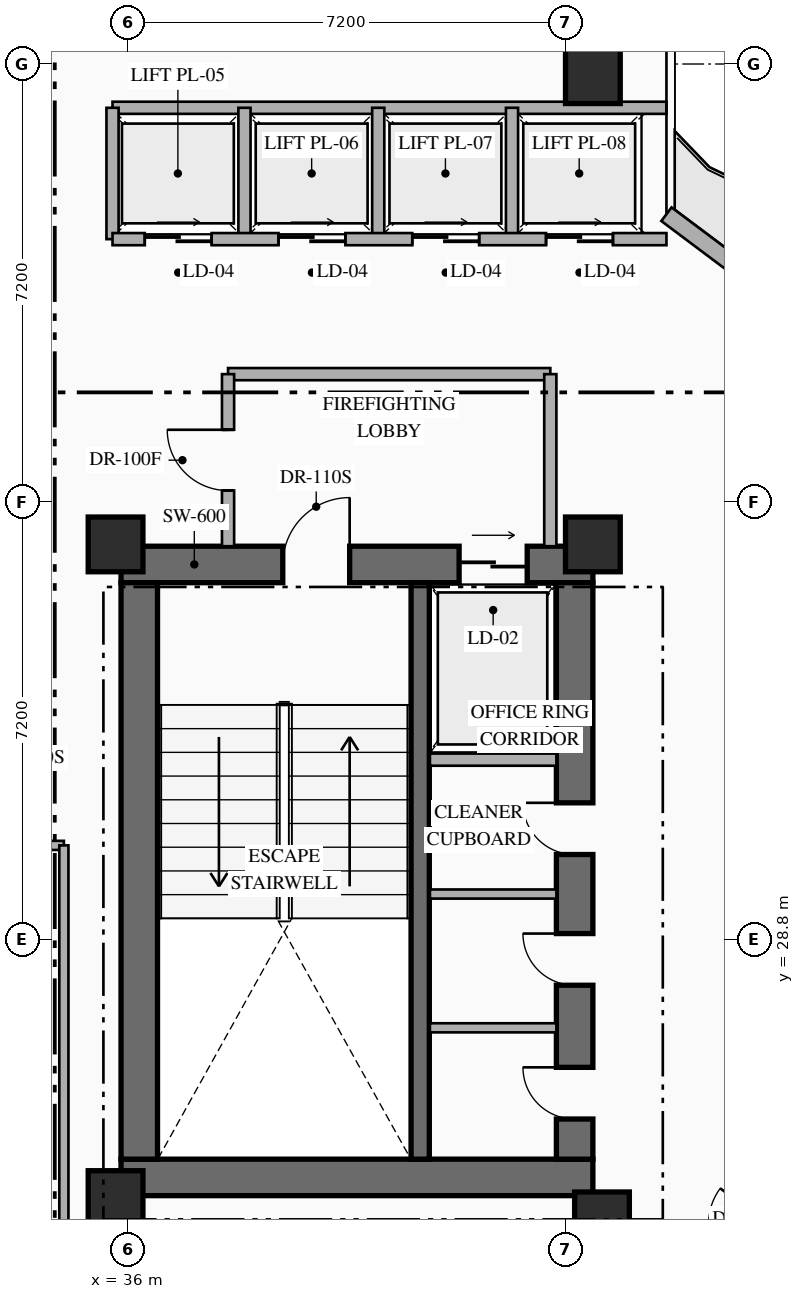
"""IFC4 building model, lengths in metres.
Left out: names, types, materials, properties, quantities, classifications, styles, units other than length and angle.
Written with IfcOpenShell. Run it as: python <this file> out.ifc"""

import sys

from ifc_helpers import new_model, si_unit, direction, frame, frame_2d, origin, origin_2d, place, context, subcontext, project, spatial, rectangle, extrude, element, fill, save


model = new_model("IFC4")
c1 = context("Model", 3, precision=1e-05, world=origin(), true_north=direction((0.0, 1.0)))
c2 = subcontext(c1, "Body", "Model", "MODEL_VIEW")
j1 = project(units=[si_unit("LENGTHUNIT", "METRE"), si_unit("PLANEANGLEUNIT", "RADIAN")], contexts=[c1])
p1 = place(None, origin())
s1 = spatial("IfcSite", under=j1, at=p1, CompositionType="ELEMENT")
p2 = place(p1, origin())
s2 = spatial("IfcBuilding", under=s1, at=p2, CompositionType="ELEMENT")
p3 = place(p2, frame((0.0, 0.0, 115.65)))
s3 = spatial("IfcBuildingStorey", under=s2, at=p3, CompositionType="ELEMENT", Elevation=115.65)
p4 = place(p3, frame((35.89, 24.89, 0.0), z_axis=(0.0, 0.0, 1.0), x_axis=(1.0, 0.0, 0.0)))
e1 = element("IfcWall", 1, at=p4, inside=s3, PredefinedType="SHEAR", context=c2, shape_type="SweptSolid", body=[
    extrude(rectangle(XDim=7.76, YDim=0.6, at=frame_2d((3.88, 0.0))), origin(), (0.0, 0.0, 1.0), 3.6),
])
p5 = place(p3, frame((35.89, 34.97, 0.0), z_axis=(0.0, 0.0, 1.0), x_axis=(1.0, 0.0, 0.0)))
e2 = element("IfcWall", 2, at=p5, inside=s3, PredefinedType="SHEAR", context=c2, shape_type="SweptSolid", body=[
    extrude(rectangle(XDim=7.76, YDim=0.6, at=frame_2d((3.88, 0.0))), origin(), (0.0, 0.0, 1.0), 3.6),
])
p6 = place(p5, frame((2.66, 0.0, 0.0)))
e3 = element("IfcOpeningElement", 3, at=p6, cuts=e2, PredefinedType="OPENING", context=c2, shape_type="SweptSolid", body=[
    extrude(rectangle(XDim=1.1, YDim=2.2, at=frame_2d((0.55, 1.1))), frame((0.0, 0.31, 0.0), z_axis=(0.0, -1.0, 0.0), x_axis=(1.0, 0.0, 0.0)), (0.0, 0.0, 1.0), 0.62),
])
p7 = place(p5, frame((5.56, 0.0, 0.0)))
e4 = element("IfcOpeningElement", 4, at=p7, cuts=e2, PredefinedType="OPENING", context=c2, shape_type="SweptSolid", body=[
    extrude(rectangle(XDim=1.12, YDim=2.15, at=frame_2d((0.56, 1.075))), frame((0.0, 0.31, 0.0), z_axis=(0.0, -1.0, 0.0), x_axis=(1.0, 0.0, 0.0)), (0.0, 0.0, 1.0), 0.62),
])
p8 = place(p3, frame((36.19, 25.19, 0.0), z_axis=(0.0, 0.0, 1.0), x_axis=(0.0, 1.0, 0.0)))
e5 = element("IfcWall", 5, at=p8, inside=s3, PredefinedType="SHEAR", context=c2, shape_type="SweptSolid", body=[
    extrude(rectangle(XDim=9.48, YDim=0.6, at=frame_2d((4.74, 0.0))), origin(), (0.0, 0.0, 1.0), 3.6),
])
p9 = place(p3, frame((43.35, 25.19, 0.0), z_axis=(0.0, 0.0, 1.0), x_axis=(0.0, 1.0, 0.0)))
e6 = element("IfcWall", 6, at=p9, inside=s3, PredefinedType="SHEAR", context=c2, shape_type="SweptSolid", body=[
    extrude(rectangle(XDim=9.48, YDim=0.6, at=frame_2d((4.74, 0.0))), origin(), (0.0, 0.0, 1.0), 3.6),
])
p10 = place(p9, frame((0.66, 0.0, 0.0)))
e7 = element("IfcOpeningElement", 7, at=p10, cuts=e6, PredefinedType="OPENING", context=c2, shape_type="SweptSolid", body=[
    extrude(rectangle(XDim=0.85, YDim=2.08, at=frame_2d((0.425, 1.04))), frame((0.0, 0.31, 0.0), z_axis=(0.0, -1.0, 0.0), x_axis=(1.0, 0.0, 0.0)), (0.0, 0.0, 1.0), 0.62),
])
p11 = place(p9, frame((2.86, 0.0, 0.0)))
e8 = element("IfcOpeningElement", 8, at=p11, cuts=e6, PredefinedType="OPENING", context=c2, shape_type="SweptSolid", body=[
    extrude(rectangle(XDim=0.85, YDim=2.08, at=frame_2d((0.425, 1.04))), frame((0.0, 0.31, 0.0), z_axis=(0.0, -1.0, 0.0), x_axis=(1.0, 0.0, 0.0)), (0.0, 0.0, 1.0), 0.62),
])
p12 = place(p9, frame((5.01, 0.0, 0.0)))
e9 = element("IfcOpeningElement", 9, at=p12, cuts=e6, PredefinedType="OPENING", context=c2, shape_type="SweptSolid", body=[
    extrude(rectangle(XDim=0.85, YDim=2.08, at=frame_2d((0.425, 1.04))), frame((0.0, 0.31, 0.0), z_axis=(0.0, -1.0, 0.0), x_axis=(1.0, 0.0, 0.0)), (0.0, 0.0, 1.0), 0.62),
])
p13 = place(p3, frame((40.81, 25.19, 0.0), z_axis=(0.0, 0.0, 1.0), x_axis=(0.0, 1.0, 0.0)))
e10 = element("IfcWall", 10, at=p13, inside=s3, PredefinedType="SHEAR", context=c2, shape_type="SweptSolid", body=[
    extrude(rectangle(XDim=9.48, YDim=0.3, at=frame_2d((4.74, 0.0))), origin(), (0.0, 0.0, 1.0), 3.6),
])
for number, where, z_axis, x_axis in (
    (11, (35.8, 24.55, 0.0), (0.0, 0.0, 1.0), (1.0, 0.0, 0.0)),
    (12, (43.8, 24.2, 0.0), (0.0, 0.0, 1.0), (1.0, 0.0, 0.0)),
    (13, (35.8, 35.3, 0.0), (0.0, 0.0, 1.0), (1.0, 0.0, 0.0)),
    (14, (43.65, 35.3, 0.0), (0.0, 0.0, 1.0), (1.0, 0.0, 0.0)),
    (15, (43.65, 43.0, 0.0), (0.0, 0.0, 1.0), (1.0, 0.0, 0.0)),
):
    element("IfcColumn", number, at=place(p3, frame(where, z_axis=z_axis, x_axis=x_axis)), inside=s3, PredefinedType="COLUMN", context=c2, shape_type="SweptSolid", body=[
        extrude(rectangle(XDim=0.9, YDim=0.9, at=origin_2d()), origin(), (0.0, 0.0, 1.0), 3.6),
    ])
p14 = place(p3, frame((44.86, 40.73, 0.0), z_axis=(0.0, 0.0, 1.0), x_axis=(0.800006902154, -0.599990797017, 0.0)))
e16 = element("IfcWall", 16, at=p14, inside=s3, PredefinedType="STANDARD", context=c2, shape_type="SweptSolid", body=[
    extrude(rectangle(XDim=29.712, YDim=0.28, at=frame_2d((14.856, 0.0))), origin(), (0.0, 0.0, 1.0), 3.35),
])
p15 = place(p14, frame((14.249, 0.0, 0.0)))
e17 = element("IfcOpeningElement", 17, at=p15, cuts=e16, PredefinedType="OPENING", context=c2, shape_type="SweptSolid", body=[
    extrude(rectangle(XDim=1.1, YDim=2.2, at=frame_2d((0.55, 1.1))), frame((0.0, 0.15, 0.0), z_axis=(0.0, -1.0, 0.0), x_axis=(1.0, 0.0, 0.0)), (0.0, 0.0, 1.0), 0.3),
])
p16 = place(p14, frame((6.528, 0.0, 0.85)))
e18 = element("IfcOpeningElement", 18, at=p16, cuts=e16, PredefinedType="OPENING", context=c2, shape_type="SweptSolid", body=[
    extrude(rectangle(XDim=1.8, YDim=2.1, at=frame_2d((0.9, 1.05))), frame((0.0, 0.15, 0.0), z_axis=(0.0, -1.0, 0.0), x_axis=(1.0, 0.0, 0.0)), (0.0, 0.0, 1.0), 0.3),
])
p17 = place(p14, frame((21.384, 0.0, 0.85)))
e19 = element("IfcOpeningElement", 19, at=p17, cuts=e16, PredefinedType="OPENING", context=c2, shape_type="SweptSolid", body=[
    extrude(rectangle(XDim=1.8, YDim=2.1, at=frame_2d((0.9, 1.05))), frame((0.0, 0.15, 0.0), z_axis=(0.0, -1.0, 0.0), x_axis=(1.0, 0.0, 0.0)), (0.0, 0.0, 1.0), 0.3),
])
p18 = place(p3, frame((40.97, 31.76, 0.0), z_axis=(0.0, 0.0, 1.0), x_axis=(1.0, 0.0, 0.0)))
e20 = element("IfcWall", 20, at=p18, inside=s3, PredefinedType="STANDARD", context=c2, shape_type="SweptSolid", body=[
    extrude(rectangle(XDim=2.08, YDim=0.2, at=frame_2d((1.04, 0.0))), origin(), (0.0, 0.0, 1.0), 3.35),
])
for number, where, z_axis, x_axis in (
    (21, (40.97, 27.35, 0.0), (0.0, 0.0, 1.0), (1.0, 0.0, 0.0)),
    (22, (40.97, 29.55, 0.0), (0.0, 0.0, 1.0), (1.0, 0.0, 0.0)),
):
    element("IfcWall", number, at=place(p3, frame(where, z_axis=z_axis, x_axis=x_axis)), inside=s3, PredefinedType="PARTITIONING", context=c2, shape_type="SweptSolid", body=[
        extrude(rectangle(XDim=2.08, YDim=0.15, at=frame_2d((1.04, 0.0))), origin(), (0.0, 0.0, 1.0), 3.35),
    ])
p19 = place(p3, frame((37.65, 38.1, 0.0), z_axis=(0.0, 0.0, 1.0), x_axis=(1.0, 0.0, 0.0)))
e23 = element("IfcWall", 23, at=p19, inside=s3, PredefinedType="STANDARD", context=c2, shape_type="SweptSolid", body=[
    extrude(rectangle(XDim=5.3, YDim=0.2, at=frame_2d((2.65, 0.0))), origin(), (0.0, 0.0, 1.0), 3.35),
])
p20 = place(p3, frame((42.95, 35.27, 0.0), z_axis=(0.0, 0.0, 1.0), x_axis=(0.0, 1.0, 0.0)))
e24 = element("IfcWall", 24, at=p20, inside=s3, PredefinedType="STANDARD", context=c2, shape_type="SweptSolid", body=[
    extrude(rectangle(XDim=2.83, YDim=0.2, at=frame_2d((1.415, 0.0))), origin(), (0.0, 0.0, 1.0), 3.35),
])
p21 = place(p3, frame((37.65, 35.27, 0.0), z_axis=(0.0, 0.0, 1.0), x_axis=(0.0, 1.0, 0.0)))
e25 = element("IfcWall", 25, at=p21, inside=s3, PredefinedType="STANDARD", context=c2, shape_type="SweptSolid", body=[
    extrude(rectangle(XDim=2.83, YDim=0.2, at=frame_2d((1.415, 0.0))), origin(), (0.0, 0.0, 1.0), 3.35),
])
p22 = place(p21, frame((0.915, 0.0, 0.0)))
e26 = element("IfcOpeningElement", 26, at=p22, cuts=e25, PredefinedType="OPENING", context=c2, shape_type="SweptSolid", body=[
    extrude(rectangle(XDim=1.0, YDim=2.2, at=frame_2d((0.5, 1.1))), frame((0.0, 0.11, 0.0), z_axis=(0.0, -1.0, 0.0), x_axis=(1.0, 0.0, 0.0)), (0.0, 0.0, 1.0), 0.22),
])
p23 = place(p3, frame((35.75, 42.48, 0.0), z_axis=(0.0, 0.0, 1.0), x_axis=(1.0, 0.0, 0.0)))
e27 = element("IfcWall", 27, at=p23, inside=s3, PredefinedType="STANDARD", context=c2, shape_type="SweptSolid", body=[
    extrude(rectangle(XDim=9.11, YDim=0.2, at=frame_2d((4.555, 0.0))), origin(), (0.0, 0.0, 1.0), 3.35),
])
for number, where, z_axis, x_axis in (
    (28, (35.75, 40.32, 0.0), (0.0, 0.0, 1.0), (0.0, 1.0, 0.0)),
    (29, (37.92, 40.32, 0.0), (0.0, 0.0, 1.0), (0.0, 1.0, 0.0)),
    (30, (40.12, 40.32, 0.0), (0.0, 0.0, 1.0), (0.0, 1.0, 0.0)),
    (31, (42.32, 40.32, 0.0), (0.0, 0.0, 1.0), (0.0, 1.0, 0.0)),
):
    element("IfcWall", number, at=place(p3, frame(where, z_axis=z_axis, x_axis=x_axis)), inside=s3, PredefinedType="STANDARD", context=c2, shape_type="SweptSolid", body=[
        extrude(rectangle(XDim=2.16, YDim=0.2, at=frame_2d((1.08, 0.0))), origin(), (0.0, 0.0, 1.0), 3.35),
    ])
p24 = place(p3, frame((35.75, 40.32, 0.0), z_axis=(0.0, 0.0, 1.0), x_axis=(1.0, 0.0, 0.0)))
e32 = element("IfcWall", 32, at=p24, inside=s3, PredefinedType="STANDARD", context=c2, shape_type="SweptSolid", body=[
    extrude(rectangle(XDim=9.11, YDim=0.2, at=frame_2d((4.555, 0.0))), origin(), (0.0, 0.0, 1.0), 3.35),
])
p25 = place(p24, frame((0.53, 0.0, 0.0)))
e33 = element("IfcOpeningElement", 33, at=p25, cuts=e32, PredefinedType="OPENING", context=c2, shape_type="SweptSolid", body=[
    extrude(rectangle(XDim=1.1, YDim=2.18, at=frame_2d((0.55, 1.09))), frame((0.0, 0.11, 0.0), z_axis=(0.0, -1.0, 0.0), x_axis=(1.0, 0.0, 0.0)), (0.0, 0.0, 1.0), 0.22),
])
p26 = place(p24, frame((2.73, 0.0, 0.0)))
e34 = element("IfcOpeningElement", 34, at=p26, cuts=e32, PredefinedType="OPENING", context=c2, shape_type="SweptSolid", body=[
    extrude(rectangle(XDim=1.1, YDim=2.18, at=frame_2d((0.55, 1.09))), frame((0.0, 0.11, 0.0), z_axis=(0.0, -1.0, 0.0), x_axis=(1.0, 0.0, 0.0)), (0.0, 0.0, 1.0), 0.22),
])
p27 = place(p24, frame((4.93, 0.0, 0.0)))
e35 = element("IfcOpeningElement", 35, at=p27, cuts=e32, PredefinedType="OPENING", context=c2, shape_type="SweptSolid", body=[
    extrude(rectangle(XDim=1.1, YDim=2.18, at=frame_2d((0.55, 1.09))), frame((0.0, 0.11, 0.0), z_axis=(0.0, -1.0, 0.0), x_axis=(1.0, 0.0, 0.0)), (0.0, 0.0, 1.0), 0.22),
])
p28 = place(p24, frame((7.13, 0.0, 0.0)))
e36 = element("IfcOpeningElement", 36, at=p28, cuts=e32, PredefinedType="OPENING", context=c2, shape_type="SweptSolid", body=[
    extrude(rectangle(XDim=1.1, YDim=2.18, at=frame_2d((0.55, 1.09))), frame((0.0, 0.11, 0.0), z_axis=(0.0, -1.0, 0.0), x_axis=(1.0, 0.0, 0.0)), (0.0, 0.0, 1.0), 0.22),
])
p29 = place(p3, frame((25.55, 30.35, 0.0), z_axis=(0.0, 0.0, 1.0), x_axis=(1.0, 0.0, 0.0)))
e37 = element("IfcWall", 37, at=p29, inside=s3, PredefinedType="PARTITIONING", context=c2, shape_type="SweptSolid", body=[
    extrude(rectangle(XDim=9.4, YDim=0.15, at=frame_2d((4.7, 0.0))), origin(), (0.0, 0.0, 1.0), 3.35),
])
p30 = place(p29, frame((7.638, 0.0, 0.0)))
e38 = element("IfcOpeningElement", 38, at=p30, cuts=e37, PredefinedType="OPENING", context=c2, shape_type="SweptSolid", body=[
    extrude(rectangle(XDim=1.0, YDim=2.15, at=frame_2d((0.5, 1.075))), frame((0.0, 0.085, 0.0), z_axis=(0.0, -1.0, 0.0), x_axis=(1.0, 0.0, 0.0)), (0.0, 0.0, 1.0), 0.17),
])
p31 = place(p3, frame((34.95, 23.2, 0.0), z_axis=(0.0, 0.0, 1.0), x_axis=(0.0, 1.0, 0.0)))
e39 = element("IfcWall", 39, at=p31, inside=s3, PredefinedType="PARTITIONING", context=c2, shape_type="SweptSolid", body=[
    extrude(rectangle(XDim=7.15, YDim=0.15, at=frame_2d((3.575, 0.0))), origin(), (0.0, 0.0, 1.0), 3.35),
])
p32 = place(p3, frame((38.504, 13.472, 0.0), z_axis=(0.0, 0.0, 1.0), x_axis=(0.6, 0.8, 0.0)))
e40 = element("IfcWall", 40, at=p32, inside=s3, PredefinedType="PARTITIONING", context=c2, shape_type="SweptSolid", body=[
    extrude(rectangle(XDim=25.72, YDim=0.15, at=frame_2d((12.86, 0.0))), origin(), (0.0, 0.0, 1.0), 3.35),
])
p33 = place(p32, frame((12.385, 0.0, 0.0)))
e41 = element("IfcOpeningElement", 41, at=p33, cuts=e40, PredefinedType="OPENING", context=c2, shape_type="SweptSolid", body=[
    extrude(rectangle(XDim=0.95, YDim=2.15, at=frame_2d((0.475, 1.075))), frame((0.0, 0.085, 0.0), z_axis=(0.0, -1.0, 0.0), x_axis=(1.0, 0.0, 0.0)), (0.0, 0.0, 1.0), 0.17),
])
p34 = place(p6, origin())
e42 = element("IfcDoor", 42, at=p34, inside=s3, OperationType="SINGLE_SWING_RIGHT", PredefinedType="DOOR", context=c2, shape_type="SweptSolid", body=[
    extrude(rectangle(XDim=1.1, YDim=2.2, at=frame_2d((0.55, 1.1))), frame((0.0, 0.025, 0.0), z_axis=(0.0, -1.0, 0.0), x_axis=(1.0, 0.0, 0.0)), (0.0, 0.0, 1.0), 0.05),
])
fill(e3, e42)
p35 = place(p7, origin())
e43 = element("IfcDoor", 43, at=p35, inside=s3, OperationType="SLIDING_TO_RIGHT", PredefinedType="USERDEFINED", context=c2, shape_type="SweptSolid", body=[
    extrude(rectangle(XDim=1.12, YDim=2.15, at=frame_2d((0.56, 1.075))), frame((0.0, 0.025, 0.0), z_axis=(0.0, -1.0, 0.0), x_axis=(1.0, 0.0, 0.0)), (0.0, 0.0, 1.0), 0.05),
])
fill(e4, e43)
p36 = place(p10, origin())
e44 = element("IfcDoor", 44, at=p36, inside=s3, OperationType="SINGLE_SWING_RIGHT", PredefinedType="DOOR", context=c2, shape_type="SweptSolid", body=[
    extrude(rectangle(XDim=0.85, YDim=2.08, at=frame_2d((0.425, 1.04))), frame((0.0, 0.025, 0.0), z_axis=(0.0, -1.0, 0.0), x_axis=(1.0, 0.0, 0.0)), (0.0, 0.0, 1.0), 0.05),
])
fill(e7, e44)
p37 = place(p11, origin())
e45 = element("IfcDoor", 45, at=p37, inside=s3, OperationType="SINGLE_SWING_RIGHT", PredefinedType="DOOR", context=c2, shape_type="SweptSolid", body=[
    extrude(rectangle(XDim=0.85, YDim=2.08, at=frame_2d((0.425, 1.04))), frame((0.0, 0.025, 0.0), z_axis=(0.0, -1.0, 0.0), x_axis=(1.0, 0.0, 0.0)), (0.0, 0.0, 1.0), 0.05),
])
fill(e8, e45)
p38 = place(p12, origin())
e46 = element("IfcDoor", 46, at=p38, inside=s3, OperationType="SINGLE_SWING_RIGHT", PredefinedType="DOOR", context=c2, shape_type="SweptSolid", body=[
    extrude(rectangle(XDim=0.85, YDim=2.08, at=frame_2d((0.425, 1.04))), frame((0.0, 0.025, 0.0), z_axis=(0.0, -1.0, 0.0), x_axis=(1.0, 0.0, 0.0)), (0.0, 0.0, 1.0), 0.05),
])
fill(e9, e46)
p39 = place(p22, origin())
e47 = element("IfcDoor", 47, at=p39, inside=s3, OperationType="SINGLE_SWING_RIGHT", PredefinedType="DOOR", context=c2, shape_type="SweptSolid", body=[
    extrude(rectangle(XDim=1.0, YDim=2.2, at=frame_2d((0.5, 1.1))), frame((0.0, 0.025, 0.0), z_axis=(0.0, -1.0, 0.0), x_axis=(1.0, 0.0, 0.0)), (0.0, 0.0, 1.0), 0.05),
])
fill(e26, e47)
p40 = place(p25, origin())
e48 = element("IfcDoor", 48, at=p40, inside=s3, OperationType="SLIDING_TO_RIGHT", PredefinedType="USERDEFINED", context=c2, shape_type="SweptSolid", body=[
    extrude(rectangle(XDim=1.1, YDim=2.18, at=frame_2d((0.55, 1.09))), frame((0.0, 0.025, 0.0), z_axis=(0.0, -1.0, 0.0), x_axis=(1.0, 0.0, 0.0)), (0.0, 0.0, 1.0), 0.05),
])
fill(e33, e48)
p41 = place(p26, origin())
e49 = element("IfcDoor", 49, at=p41, inside=s3, OperationType="SLIDING_TO_RIGHT", PredefinedType="USERDEFINED", context=c2, shape_type="SweptSolid", body=[
    extrude(rectangle(XDim=1.1, YDim=2.18, at=frame_2d((0.55, 1.09))), frame((0.0, 0.025, 0.0), z_axis=(0.0, -1.0, 0.0), x_axis=(1.0, 0.0, 0.0)), (0.0, 0.0, 1.0), 0.05),
])
fill(e34, e49)
p42 = place(p27, origin())
e50 = element("IfcDoor", 50, at=p42, inside=s3, OperationType="SLIDING_TO_RIGHT", PredefinedType="USERDEFINED", context=c2, shape_type="SweptSolid", body=[
    extrude(rectangle(XDim=1.1, YDim=2.18, at=frame_2d((0.55, 1.09))), frame((0.0, 0.025, 0.0), z_axis=(0.0, -1.0, 0.0), x_axis=(1.0, 0.0, 0.0)), (0.0, 0.0, 1.0), 0.05),
])
fill(e35, e50)
p43 = place(p28, origin())
e51 = element("IfcDoor", 51, at=p43, inside=s3, OperationType="SLIDING_TO_RIGHT", PredefinedType="USERDEFINED", context=c2, shape_type="SweptSolid", body=[
    extrude(rectangle(XDim=1.1, YDim=2.18, at=frame_2d((0.55, 1.09))), frame((0.0, 0.025, 0.0), z_axis=(0.0, -1.0, 0.0), x_axis=(1.0, 0.0, 0.0)), (0.0, 0.0, 1.0), 0.05),
])
fill(e36, e51)
save(model, sys.argv[1])
